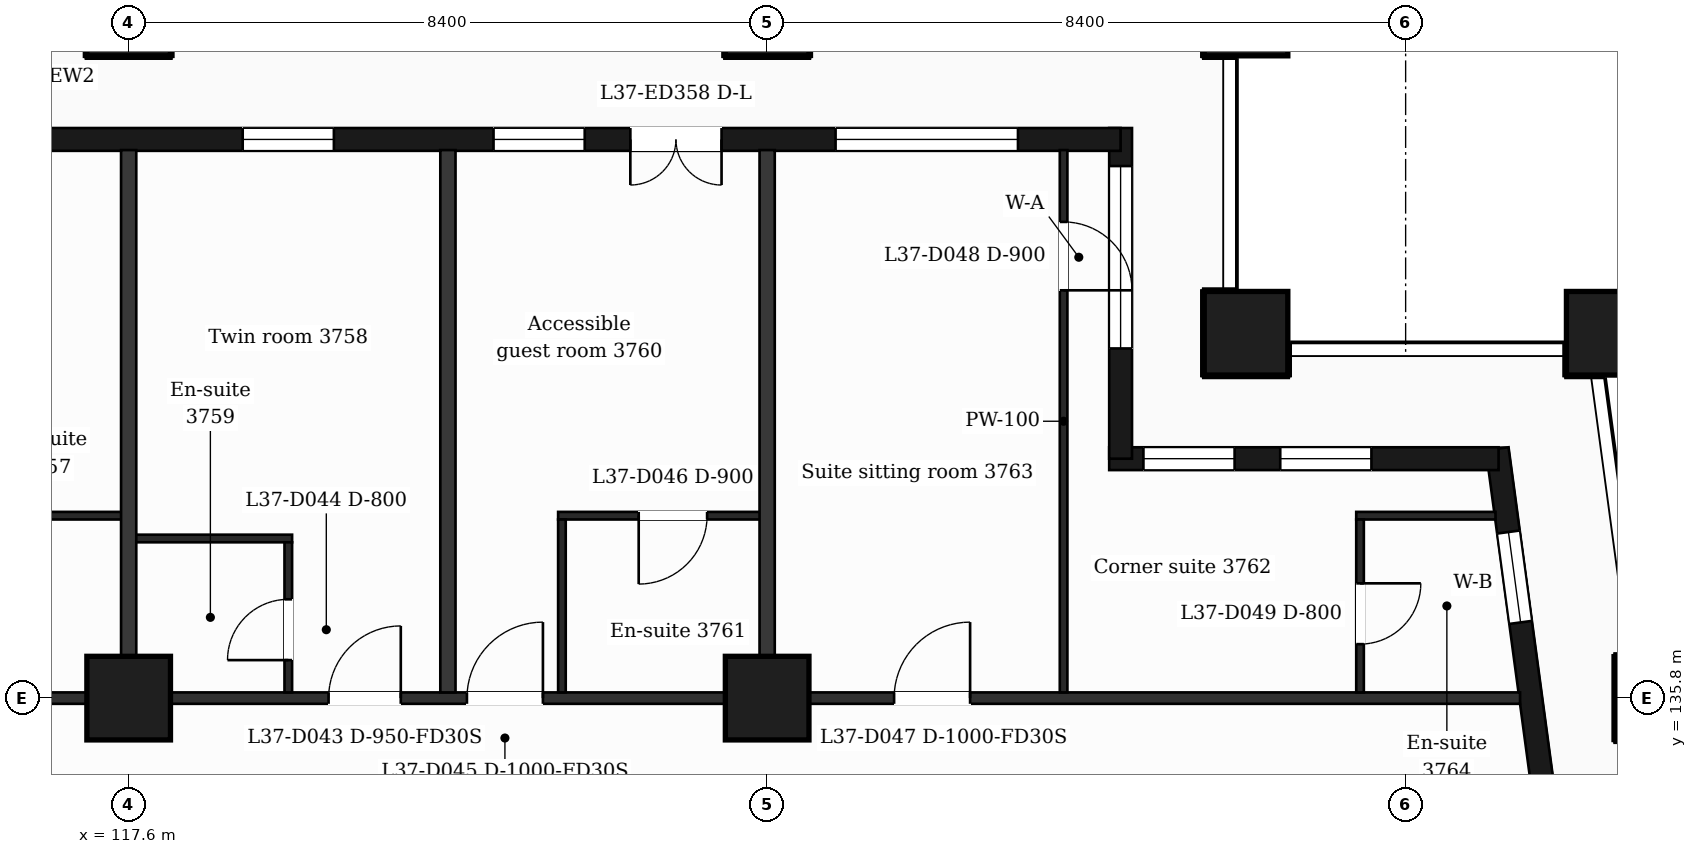
"""IFC4 building model, lengths in metres.
Left out: names, types, materials, properties, quantities, classifications, styles, units other than length and angle.
Written with IfcOpenShell. Run it as: python <this file> out.ifc"""

import sys

from ifc_helpers import new_model, si_unit, direction, frame, frame_2d, origin, origin_2d, place, context, subcontext, project, spatial, rectangle, extrude, element, fill, save


model = new_model("IFC4")
c1 = context("Model", 3, precision=1e-05, world=origin(), true_north=direction((0.0, 1.0)))
c2 = subcontext(c1, "Body", "Model", "MODEL_VIEW")
j1 = project(units=[si_unit("LENGTHUNIT", "METRE"), si_unit("PLANEANGLEUNIT", "RADIAN")], contexts=[c1])
p1 = place(None, origin())
s1 = spatial("IfcSite", under=j1, at=p1, CompositionType="ELEMENT")
p2 = place(p1, origin())
s2 = spatial("IfcBuilding", under=s1, at=p2, CompositionType="ELEMENT")
p3 = place(p2, frame((0.0, 0.0, 158.9)))
s3 = spatial("IfcBuildingStorey", under=s2, at=p3, CompositionType="ELEMENT", Elevation=158.9)
for number, where, z_axis, x_axis in (
    (1, (132.3, 140.6, 0.0), (0.0, 0.0, 1.0), (1.0, 0.0, 0.0)),
    (2, (137.065, 140.6, 0.0), (0.0, 0.0, 1.0), (1.0, 0.0, 0.0)),
    (3, (117.6, 135.8, 0.0), (0.0, 0.0, 1.0), (1.0, 0.0, 0.0)),
    (4, (126.0, 135.8, 0.0), (0.0, 0.0, 1.0), (1.0, 0.0, 0.0)),
    (5, (137.711, 135.8, 0.0), (0.0, 0.0, 1.0), (1.0, 0.0, 0.0)),
    (6, (117.6, 144.8, 0.0), (0.0, 0.0, 1.0), (1.0, 0.0, 0.0)),
    (7, (126.0, 144.8, 0.0), (0.0, 0.0, 1.0), (1.0, 0.0, 0.0)),
    (8, (132.3, 144.8, 0.0), (0.0, 0.0, 1.0), (1.0, 0.0, 0.0)),
):
    element("IfcColumn", number, at=place(p3, frame(where, z_axis=z_axis, x_axis=x_axis)), inside=s3, PredefinedType="COLUMN", context=c2, shape_type="SweptSolid", body=[
        extrude(rectangle(XDim=1.1, YDim=1.1, at=origin_2d()), origin(), (0.0, 0.0, 1.0), 3.7),
    ])
p4 = place(p3, frame((136.504, 132.4, 0.0), z_axis=(0.0, 0.0, 1.0), x_axis=(-0.133399697462, 0.99106231929, 0.0)))
e9 = element("IfcWall", 9, at=p4, inside=s3, PredefinedType="SOLIDWALL", context=c2, shape_type="SweptSolid", body=[
    extrude(rectangle(XDim=6.74, YDim=0.3, at=frame_2d((3.37, 0.0))), origin(), (0.0, 0.0, 1.0), 3.38),
])
p5 = place(p4, frame((1.115, 0.0, 0.0)))
e10 = element("IfcOpeningElement", 10, at=p5, cuts=e9, PredefinedType="OPENING", context=c2, shape_type="SweptSolid", body=[
    extrude(rectangle(XDim=1.2, YDim=2.4, at=frame_2d((0.6, 1.2))), frame((0.0, 0.16, 0.0), z_axis=(0.0, -1.0, 0.0), x_axis=(1.0, 0.0, 0.0)), (0.0, 0.0, 1.0), 0.32),
])
p6 = place(p4, frame((4.436, 0.0, 0.9)))
e11 = element("IfcOpeningElement", 11, at=p6, cuts=e9, PredefinedType="OPENING", context=c2, shape_type="SweptSolid", body=[
    extrude(rectangle(XDim=1.2, YDim=2.1, at=frame_2d((0.6, 1.05))), frame((0.0, 0.16, 0.0), z_axis=(0.0, -1.0, 0.0), x_axis=(1.0, 0.0, 0.0)), (0.0, 0.0, 1.0), 0.32),
])
p7 = place(p3, frame((135.623, 138.95, 0.0), z_axis=(0.0, 0.0, 1.0), x_axis=(-1.0, 0.0, 0.0)))
e12 = element("IfcWall", 12, at=p7, inside=s3, PredefinedType="SOLIDWALL", context=c2, shape_type="SweptSolid", body=[
    extrude(rectangle(XDim=5.123, YDim=0.3, at=frame_2d((2.561, 0.0))), origin(), (0.0, 0.0, 1.0), 3.38),
])
p8 = place(p7, frame((1.673, 0.0, 0.9)))
e13 = element("IfcOpeningElement", 13, at=p8, cuts=e12, PredefinedType="OPENING", context=c2, shape_type="SweptSolid", body=[
    extrude(rectangle(XDim=1.2, YDim=2.1, at=frame_2d((0.6, 1.05))), frame((0.0, 0.16, 0.0), z_axis=(0.0, -1.0, 0.0), x_axis=(1.0, 0.0, 0.0)), (0.0, 0.0, 1.0), 0.32),
])
p9 = place(p7, frame((3.473, 0.0, 0.9)))
e14 = element("IfcOpeningElement", 14, at=p9, cuts=e12, PredefinedType="OPENING", context=c2, shape_type="SweptSolid", body=[
    extrude(rectangle(XDim=1.2, YDim=2.1, at=frame_2d((0.6, 1.05))), frame((0.0, 0.16, 0.0), z_axis=(0.0, -1.0, 0.0), x_axis=(1.0, 0.0, 0.0)), (0.0, 0.0, 1.0), 0.32),
])
p10 = place(p3, frame((130.65, 138.95, 0.0), z_axis=(0.0, 0.0, 1.0), x_axis=(0.0, 1.0, 0.0)))
e15 = element("IfcWall", 15, at=p10, inside=s3, PredefinedType="SOLIDWALL", context=c2, shape_type="SweptSolid", body=[
    extrude(rectangle(XDim=4.35, YDim=0.3, at=frame_2d((2.175, 0.0))), origin(), (0.0, 0.0, 1.0), 3.38),
])
p11 = place(p10, frame((1.45, 0.0, 0.9)))
e16 = element("IfcOpeningElement", 16, at=p11, cuts=e15, PredefinedType="OPENING", context=c2, shape_type="SweptSolid", body=[
    extrude(rectangle(XDim=2.4, YDim=2.1, at=frame_2d((1.2, 1.05))), frame((0.0, 0.16, 0.0), z_axis=(0.0, -1.0, 0.0), x_axis=(1.0, 0.0, 0.0)), (0.0, 0.0, 1.0), 0.32),
])
p12 = place(p3, frame((130.65, 143.15, 0.0), z_axis=(0.0, 0.0, 1.0), x_axis=(-1.0, 0.0, 0.0)))
e17 = element("IfcWall", 17, at=p12, inside=s3, PredefinedType="SOLIDWALL", context=c2, shape_type="SweptSolid", body=[
    extrude(rectangle(XDim=14.25, YDim=0.3, at=frame_2d((7.125, 0.0))), origin(), (0.0, 0.0, 1.0), 3.38),
])
p13 = place(p12, frame((1.35, 0.0, 0.9)))
e18 = element("IfcOpeningElement", 18, at=p13, cuts=e17, PredefinedType="OPENING", context=c2, shape_type="SweptSolid", body=[
    extrude(rectangle(XDim=2.4, YDim=2.1, at=frame_2d((1.2, 1.05))), frame((0.0, 0.16, 0.0), z_axis=(0.0, -1.0, 0.0), x_axis=(1.0, 0.0, 0.0)), (0.0, 0.0, 1.0), 0.32),
])
p14 = place(p12, frame((5.25, 0.0, 0.0)))
e19 = element("IfcOpeningElement", 19, at=p14, cuts=e17, PredefinedType="OPENING", context=c2, shape_type="SweptSolid", body=[
    extrude(rectangle(XDim=1.2, YDim=2.4, at=frame_2d((0.6, 1.2))), frame((0.0, 0.16, 0.0), z_axis=(0.0, -1.0, 0.0), x_axis=(1.0, 0.0, 0.0)), (0.0, 0.0, 1.0), 0.32),
])
p15 = place(p12, frame((7.05, 0.0, 0.9)))
e20 = element("IfcOpeningElement", 20, at=p15, cuts=e17, PredefinedType="OPENING", context=c2, shape_type="SweptSolid", body=[
    extrude(rectangle(XDim=1.2, YDim=2.1, at=frame_2d((0.6, 1.05))), frame((0.0, 0.16, 0.0), z_axis=(0.0, -1.0, 0.0), x_axis=(1.0, 0.0, 0.0)), (0.0, 0.0, 1.0), 0.32),
])
p16 = place(p12, frame((10.35, 0.0, 0.9)))
e21 = element("IfcOpeningElement", 21, at=p16, cuts=e17, PredefinedType="OPENING", context=c2, shape_type="SweptSolid", body=[
    extrude(rectangle(XDim=1.2, YDim=2.1, at=frame_2d((0.6, 1.05))), frame((0.0, 0.16, 0.0), z_axis=(0.0, -1.0, 0.0), x_axis=(1.0, 0.0, 0.0)), (0.0, 0.0, 1.0), 0.32),
])
p17 = place(p3, frame((90.895, 135.8, 0.0), z_axis=(0.0, 0.0, 1.0), x_axis=(1.0, 0.0, 0.0)))
e22 = element("IfcWall", 22, at=p17, inside=s3, PredefinedType="PARTITIONING", context=c2, shape_type="SweptSolid", body=[
    extrude(rectangle(XDim=45.011, YDim=0.15, at=frame_2d((22.505, 0.0))), origin(), (0.0, 0.0, 1.0), 3.38),
])
p18 = place(p17, frame((8.005, 0.0, 0.0)))
e23 = element("IfcOpeningElement", 23, at=p18, cuts=e22, PredefinedType="OPENING", context=c2, shape_type="SweptSolid", body=[
    extrude(rectangle(XDim=1.0, YDim=2.1, at=frame_2d((0.5, 1.05))), frame((0.0, 0.085, 0.0), z_axis=(0.0, -1.0, 0.0), x_axis=(1.0, 0.0, 0.0)), (0.0, 0.0, 1.0), 0.17),
])
p19 = place(p17, frame((10.67, 0.0, 0.0)))
e24 = element("IfcOpeningElement", 24, at=p19, cuts=e22, PredefinedType="OPENING", context=c2, shape_type="SweptSolid", body=[
    extrude(rectangle(XDim=0.95, YDim=2.1, at=frame_2d((0.475, 1.05))), frame((0.0, 0.085, 0.0), z_axis=(0.0, -1.0, 0.0), x_axis=(1.0, 0.0, 0.0)), (0.0, 0.0, 1.0), 0.17),
])
p20 = place(p17, frame((16.59, 0.0, 0.0)))
e25 = element("IfcOpeningElement", 25, at=p20, cuts=e22, PredefinedType="OPENING", context=c2, shape_type="SweptSolid", body=[
    extrude(rectangle(XDim=0.95, YDim=2.1, at=frame_2d((0.475, 1.05))), frame((0.0, 0.085, 0.0), z_axis=(0.0, -1.0, 0.0), x_axis=(1.0, 0.0, 0.0)), (0.0, 0.0, 1.0), 0.17),
])
p21 = place(p17, frame((20.98, 0.0, 0.0)))
e26 = element("IfcOpeningElement", 26, at=p21, cuts=e22, PredefinedType="OPENING", context=c2, shape_type="SweptSolid", body=[
    extrude(rectangle(XDim=0.95, YDim=2.1, at=frame_2d((0.475, 1.05))), frame((0.0, 0.085, 0.0), z_axis=(0.0, -1.0, 0.0), x_axis=(1.0, 0.0, 0.0)), (0.0, 0.0, 1.0), 0.17),
])
p22 = place(p17, frame((29.335, 0.0, 0.0)))
e27 = element("IfcOpeningElement", 27, at=p22, cuts=e22, PredefinedType="OPENING", context=c2, shape_type="SweptSolid", body=[
    extrude(rectangle(XDim=0.95, YDim=2.1, at=frame_2d((0.475, 1.05))), frame((0.0, 0.085, 0.0), z_axis=(0.0, -1.0, 0.0), x_axis=(1.0, 0.0, 0.0)), (0.0, 0.0, 1.0), 0.17),
])
p23 = place(p17, frame((31.156, 0.0, 0.0)))
e28 = element("IfcOpeningElement", 28, at=p23, cuts=e22, PredefinedType="OPENING", context=c2, shape_type="SweptSolid", body=[
    extrude(rectangle(XDim=1.0, YDim=2.1, at=frame_2d((0.5, 1.05))), frame((0.0, 0.085, 0.0), z_axis=(0.0, -1.0, 0.0), x_axis=(1.0, 0.0, 0.0)), (0.0, 0.0, 1.0), 0.17),
])
p24 = place(p17, frame((36.775, 0.0, 0.0)))
e29 = element("IfcOpeningElement", 29, at=p24, cuts=e22, PredefinedType="OPENING", context=c2, shape_type="SweptSolid", body=[
    extrude(rectangle(XDim=1.0, YDim=2.1, at=frame_2d((0.5, 1.05))), frame((0.0, 0.085, 0.0), z_axis=(0.0, -1.0, 0.0), x_axis=(1.0, 0.0, 0.0)), (0.0, 0.0, 1.0), 0.17),
])
p25 = place(p3, frame((117.6, 137.9, 0.0), z_axis=(0.0, 0.0, 1.0), x_axis=(1.0, 0.0, 0.0)))
e30 = element("IfcWall", 30, at=p25, inside=s3, PredefinedType="PARTITIONING", context=c2, shape_type="SweptSolid", body=[
    extrude(rectangle(XDim=2.15, YDim=0.1, at=frame_2d((1.075, 0.0))), origin(), (0.0, 0.0, 1.0), 3.38),
])
p26 = place(p3, frame((115.45, 138.2, 0.0), z_axis=(0.0, 0.0, 1.0), x_axis=(1.0, 0.0, 0.0)))
e31 = element("IfcWall", 31, at=p26, inside=s3, PredefinedType="PARTITIONING", context=c2, shape_type="SweptSolid", body=[
    extrude(rectangle(XDim=2.15, YDim=0.1, at=frame_2d((1.075, 0.0))), origin(), (0.0, 0.0, 1.0), 3.38),
])
p27 = place(p3, frame((123.25, 138.2, 0.0), z_axis=(0.0, 0.0, 1.0), x_axis=(1.0, 0.0, 0.0)))
e32 = element("IfcWall", 32, at=p27, inside=s3, PredefinedType="PARTITIONING", context=c2, shape_type="SweptSolid", body=[
    extrude(rectangle(XDim=2.75, YDim=0.1, at=frame_2d((1.375, 0.0))), origin(), (0.0, 0.0, 1.0), 3.38),
])
p28 = place(p27, frame((1.06, 0.0, 0.0)))
e33 = element("IfcOpeningElement", 33, at=p28, cuts=e32, PredefinedType="OPENING", context=c2, shape_type="SweptSolid", body=[
    extrude(rectangle(XDim=0.9, YDim=2.1, at=frame_2d((0.45, 1.05))), frame((0.0, 0.06, 0.0), z_axis=(0.0, -1.0, 0.0), x_axis=(1.0, 0.0, 0.0)), (0.0, 0.0, 1.0), 0.12),
])
p29 = place(p3, frame((133.75, 138.2, 0.0), z_axis=(0.0, 0.0, 1.0), x_axis=(1.0, 0.0, 0.0)))
e34 = element("IfcWall", 34, at=p29, inside=s3, PredefinedType="PARTITIONING", context=c2, shape_type="SweptSolid", body=[
    extrude(rectangle(XDim=1.832, YDim=0.1, at=frame_2d((0.916, 0.0))), origin(), (0.0, 0.0, 1.0), 3.38),
])
p30 = place(p3, frame((117.6, 135.875, 0.0), z_axis=(0.0, 0.0, 1.0), x_axis=(0.0, 1.0, 0.0)))
e35 = element("IfcWall", 35, at=p30, inside=s3, PredefinedType="PARTITIONING", context=c2, shape_type="SweptSolid", body=[
    extrude(rectangle(XDim=7.135, YDim=0.2, at=frame_2d((3.567, 0.0))), origin(), (0.0, 0.0, 1.0), 3.38),
])
p31 = place(p3, frame((119.7, 135.875, 0.0), z_axis=(0.0, 0.0, 1.0), x_axis=(0.0, 1.0, 0.0)))
e36 = element("IfcWall", 36, at=p31, inside=s3, PredefinedType="PARTITIONING", context=c2, shape_type="SweptSolid", body=[
    extrude(rectangle(XDim=1.975, YDim=0.1, at=frame_2d((0.988, 0.0))), origin(), (0.0, 0.0, 1.0), 3.38),
])
p32 = place(p31, frame((0.425, 0.0, 0.0)))
e37 = element("IfcOpeningElement", 37, at=p32, cuts=e36, PredefinedType="OPENING", context=c2, shape_type="SweptSolid", body=[
    extrude(rectangle(XDim=0.8, YDim=2.1, at=frame_2d((0.4, 1.05))), frame((0.0, 0.06, 0.0), z_axis=(0.0, -1.0, 0.0), x_axis=(1.0, 0.0, 0.0)), (0.0, 0.0, 1.0), 0.12),
])
p33 = place(p3, frame((121.8, 135.875, 0.0), z_axis=(0.0, 0.0, 1.0), x_axis=(0.0, 1.0, 0.0)))
e38 = element("IfcWall", 38, at=p33, inside=s3, PredefinedType="PARTITIONING", context=c2, shape_type="SweptSolid", body=[
    extrude(rectangle(XDim=7.135, YDim=0.2, at=frame_2d((3.567, 0.0))), origin(), (0.0, 0.0, 1.0), 3.38),
])
p34 = place(p3, frame((123.3, 135.875, 0.0), z_axis=(0.0, 0.0, 1.0), x_axis=(0.0, 1.0, 0.0)))
e39 = element("IfcWall", 39, at=p34, inside=s3, PredefinedType="PARTITIONING", context=c2, shape_type="SweptSolid", body=[
    extrude(rectangle(XDim=2.275, YDim=0.1, at=frame_2d((1.137, 0.0))), origin(), (0.0, 0.0, 1.0), 3.38),
])
p35 = place(p3, frame((126.0, 135.875, 0.0), z_axis=(0.0, 0.0, 1.0), x_axis=(0.0, 1.0, 0.0)))
e40 = element("IfcWall", 40, at=p35, inside=s3, PredefinedType="PARTITIONING", context=c2, shape_type="SweptSolid", body=[
    extrude(rectangle(XDim=7.135, YDim=0.2, at=frame_2d((3.567, 0.0))), origin(), (0.0, 0.0, 1.0), 3.38),
])
p36 = place(p3, frame((129.9, 135.875, 0.0), z_axis=(0.0, 0.0, 1.0), x_axis=(0.0, 1.0, 0.0)))
e41 = element("IfcWall", 41, at=p36, inside=s3, PredefinedType="PARTITIONING", context=c2, shape_type="SweptSolid", body=[
    extrude(rectangle(XDim=7.135, YDim=0.1, at=frame_2d((3.567, 0.0))), origin(), (0.0, 0.0, 1.0), 3.38),
])
p37 = place(p36, frame((5.29, 0.0, 0.0)))
e42 = element("IfcOpeningElement", 42, at=p37, cuts=e41, PredefinedType="OPENING", context=c2, shape_type="SweptSolid", body=[
    extrude(rectangle(XDim=0.9, YDim=2.1, at=frame_2d((0.45, 1.05))), frame((0.0, 0.06, 0.0), z_axis=(0.0, -1.0, 0.0), x_axis=(1.0, 0.0, 0.0)), (0.0, 0.0, 1.0), 0.12),
])
p38 = place(p3, frame((133.8, 135.875, 0.0), z_axis=(0.0, 0.0, 1.0), x_axis=(0.0, 1.0, 0.0)))
e43 = element("IfcWall", 43, at=p38, inside=s3, PredefinedType="PARTITIONING", context=c2, shape_type="SweptSolid", body=[
    extrude(rectangle(XDim=2.275, YDim=0.1, at=frame_2d((1.137, 0.0))), origin(), (0.0, 0.0, 1.0), 3.38),
])
p39 = place(p38, frame((0.635, 0.0, 0.0)))
e44 = element("IfcOpeningElement", 44, at=p39, cuts=e43, PredefinedType="OPENING", context=c2, shape_type="SweptSolid", body=[
    extrude(rectangle(XDim=0.8, YDim=2.1, at=frame_2d((0.4, 1.05))), frame((0.0, 0.06, 0.0), z_axis=(0.0, -1.0, 0.0), x_axis=(1.0, 0.0, 0.0)), (0.0, 0.0, 1.0), 0.12),
])
p40 = place(p6, origin())
e45 = element("IfcWindow", 45, at=p40, inside=s3, PartitioningType="SINGLE_PANEL", PredefinedType="WINDOW", context=c2, shape_type="SweptSolid", body=[
    extrude(rectangle(XDim=1.2, YDim=2.1, at=frame_2d((0.6, 1.05))), frame((0.0, 0.03, 0.0), z_axis=(0.0, -1.0, 0.0), x_axis=(1.0, 0.0, 0.0)), (0.0, 0.0, 1.0), 0.06),
])
fill(e11, e45)
p41 = place(p8, origin())
e46 = element("IfcWindow", 46, at=p41, inside=s3, PartitioningType="SINGLE_PANEL", PredefinedType="WINDOW", context=c2, shape_type="SweptSolid", body=[
    extrude(rectangle(XDim=1.2, YDim=2.1, at=frame_2d((0.6, 1.05))), frame((0.0, 0.03, 0.0), z_axis=(0.0, -1.0, 0.0), x_axis=(1.0, 0.0, 0.0)), (0.0, 0.0, 1.0), 0.06),
])
fill(e13, e46)
p42 = place(p9, origin())
e47 = element("IfcWindow", 47, at=p42, inside=s3, PartitioningType="SINGLE_PANEL", PredefinedType="WINDOW", context=c2, shape_type="SweptSolid", body=[
    extrude(rectangle(XDim=1.2, YDim=2.1, at=frame_2d((0.6, 1.05))), frame((0.0, 0.03, 0.0), z_axis=(0.0, -1.0, 0.0), x_axis=(1.0, 0.0, 0.0)), (0.0, 0.0, 1.0), 0.06),
])
fill(e14, e47)
p43 = place(p11, origin())
e48 = element("IfcWindow", 48, at=p43, inside=s3, PartitioningType="SINGLE_PANEL", PredefinedType="WINDOW", context=c2, shape_type="SweptSolid", body=[
    extrude(rectangle(XDim=2.4, YDim=2.1, at=frame_2d((1.2, 1.05))), frame((0.0, 0.03, 0.0), z_axis=(0.0, -1.0, 0.0), x_axis=(1.0, 0.0, 0.0)), (0.0, 0.0, 1.0), 0.06),
])
fill(e16, e48)
p44 = place(p13, origin())
e49 = element("IfcWindow", 49, at=p44, inside=s3, PartitioningType="SINGLE_PANEL", PredefinedType="WINDOW", context=c2, shape_type="SweptSolid", body=[
    extrude(rectangle(XDim=2.4, YDim=2.1, at=frame_2d((1.2, 1.05))), frame((0.0, 0.03, 0.0), z_axis=(0.0, -1.0, 0.0), x_axis=(1.0, 0.0, 0.0)), (0.0, 0.0, 1.0), 0.06),
])
fill(e18, e49)
p45 = place(p14, origin())
e50 = element("IfcDoor", 50, at=p45, inside=s3, OperationType="DOUBLE_DOOR_SINGLE_SWING", PredefinedType="DOOR", context=c2, shape_type="SweptSolid", body=[
    extrude(rectangle(XDim=1.2, YDim=2.4, at=frame_2d((0.6, 1.2))), frame((0.0, 0.025, 0.0), z_axis=(0.0, -1.0, 0.0), x_axis=(1.0, 0.0, 0.0)), (0.0, 0.0, 1.0), 0.05),
])
fill(e19, e50)
p46 = place(p15, origin())
e51 = element("IfcWindow", 51, at=p46, inside=s3, PartitioningType="SINGLE_PANEL", PredefinedType="WINDOW", context=c2, shape_type="SweptSolid", body=[
    extrude(rectangle(XDim=1.2, YDim=2.1, at=frame_2d((0.6, 1.05))), frame((0.0, 0.03, 0.0), z_axis=(0.0, -1.0, 0.0), x_axis=(1.0, 0.0, 0.0)), (0.0, 0.0, 1.0), 0.06),
])
fill(e20, e51)
p47 = place(p16, origin())
e52 = element("IfcWindow", 52, at=p47, inside=s3, PartitioningType="SINGLE_PANEL", PredefinedType="WINDOW", context=c2, shape_type="SweptSolid", body=[
    extrude(rectangle(XDim=1.2, YDim=2.1, at=frame_2d((0.6, 1.05))), frame((0.0, 0.03, 0.0), z_axis=(0.0, -1.0, 0.0), x_axis=(1.0, 0.0, 0.0)), (0.0, 0.0, 1.0), 0.06),
])
fill(e21, e52)
p48 = place(p22, origin())
e53 = element("IfcDoor", 53, at=p48, inside=s3, OperationType="SINGLE_SWING_RIGHT", PredefinedType="DOOR", context=c2, shape_type="SweptSolid", body=[
    extrude(rectangle(XDim=0.95, YDim=2.1, at=frame_2d((0.475, 1.05))), frame((0.0, 0.025, 0.0), z_axis=(0.0, -1.0, 0.0), x_axis=(1.0, 0.0, 0.0)), (0.0, 0.0, 1.0), 0.05),
])
fill(e27, e53)
p49 = place(p32, origin())
e54 = element("IfcDoor", 54, at=p49, inside=s3, OperationType="SINGLE_SWING_LEFT", PredefinedType="DOOR", context=c2, shape_type="SweptSolid", body=[
    extrude(rectangle(XDim=0.8, YDim=2.1, at=frame_2d((0.4, 1.05))), frame((0.0, 0.025, 0.0), z_axis=(0.0, -1.0, 0.0), x_axis=(1.0, 0.0, 0.0)), (0.0, 0.0, 1.0), 0.05),
])
fill(e37, e54)
p50 = place(p23, origin())
e55 = element("IfcDoor", 55, at=p50, inside=s3, OperationType="SINGLE_SWING_RIGHT", PredefinedType="DOOR", context=c2, shape_type="SweptSolid", body=[
    extrude(rectangle(XDim=1.0, YDim=2.1, at=frame_2d((0.5, 1.05))), frame((0.0, 0.025, 0.0), z_axis=(0.0, -1.0, 0.0), x_axis=(1.0, 0.0, 0.0)), (0.0, 0.0, 1.0), 0.05),
])
fill(e28, e55)
p51 = place(p28, origin())
e56 = element("IfcDoor", 56, at=p51, inside=s3, OperationType="SINGLE_SWING_LEFT", PredefinedType="DOOR", context=c2, shape_type="SweptSolid", body=[
    extrude(rectangle(XDim=0.9, YDim=2.1, at=frame_2d((0.45, 1.05))), frame((0.0, 0.025, 0.0), z_axis=(0.0, -1.0, 0.0), x_axis=(1.0, 0.0, 0.0)), (0.0, 0.0, 1.0), 0.05),
])
fill(e33, e56)
p52 = place(p24, origin())
e57 = element("IfcDoor", 57, at=p52, inside=s3, OperationType="SINGLE_SWING_RIGHT", PredefinedType="DOOR", context=c2, shape_type="SweptSolid", body=[
    extrude(rectangle(XDim=1.0, YDim=2.1, at=frame_2d((0.5, 1.05))), frame((0.0, 0.025, 0.0), z_axis=(0.0, -1.0, 0.0), x_axis=(1.0, 0.0, 0.0)), (0.0, 0.0, 1.0), 0.05),
])
fill(e29, e57)
p53 = place(p37, origin())
e58 = element("IfcDoor", 58, at=p53, inside=s3, OperationType="SINGLE_SWING_LEFT", PredefinedType="DOOR", context=c2, shape_type="SweptSolid", body=[
    extrude(rectangle(XDim=0.9, YDim=2.1, at=frame_2d((0.45, 1.05))), frame((0.0, 0.025, 0.0), z_axis=(0.0, -1.0, 0.0), x_axis=(1.0, 0.0, 0.0)), (0.0, 0.0, 1.0), 0.05),
])
fill(e42, e58)
p54 = place(p39, origin())
e59 = element("IfcDoor", 59, at=p54, inside=s3, OperationType="SINGLE_SWING_RIGHT", PredefinedType="DOOR", context=c2, shape_type="SweptSolid", body=[
    extrude(rectangle(XDim=0.8, YDim=2.1, at=frame_2d((0.4, 1.05))), frame((0.0, 0.025, 0.0), z_axis=(0.0, -1.0, 0.0), x_axis=(1.0, 0.0, 0.0)), (0.0, 0.0, 1.0), 0.05),
])
fill(e44, e59)
save(model, sys.argv[1])
